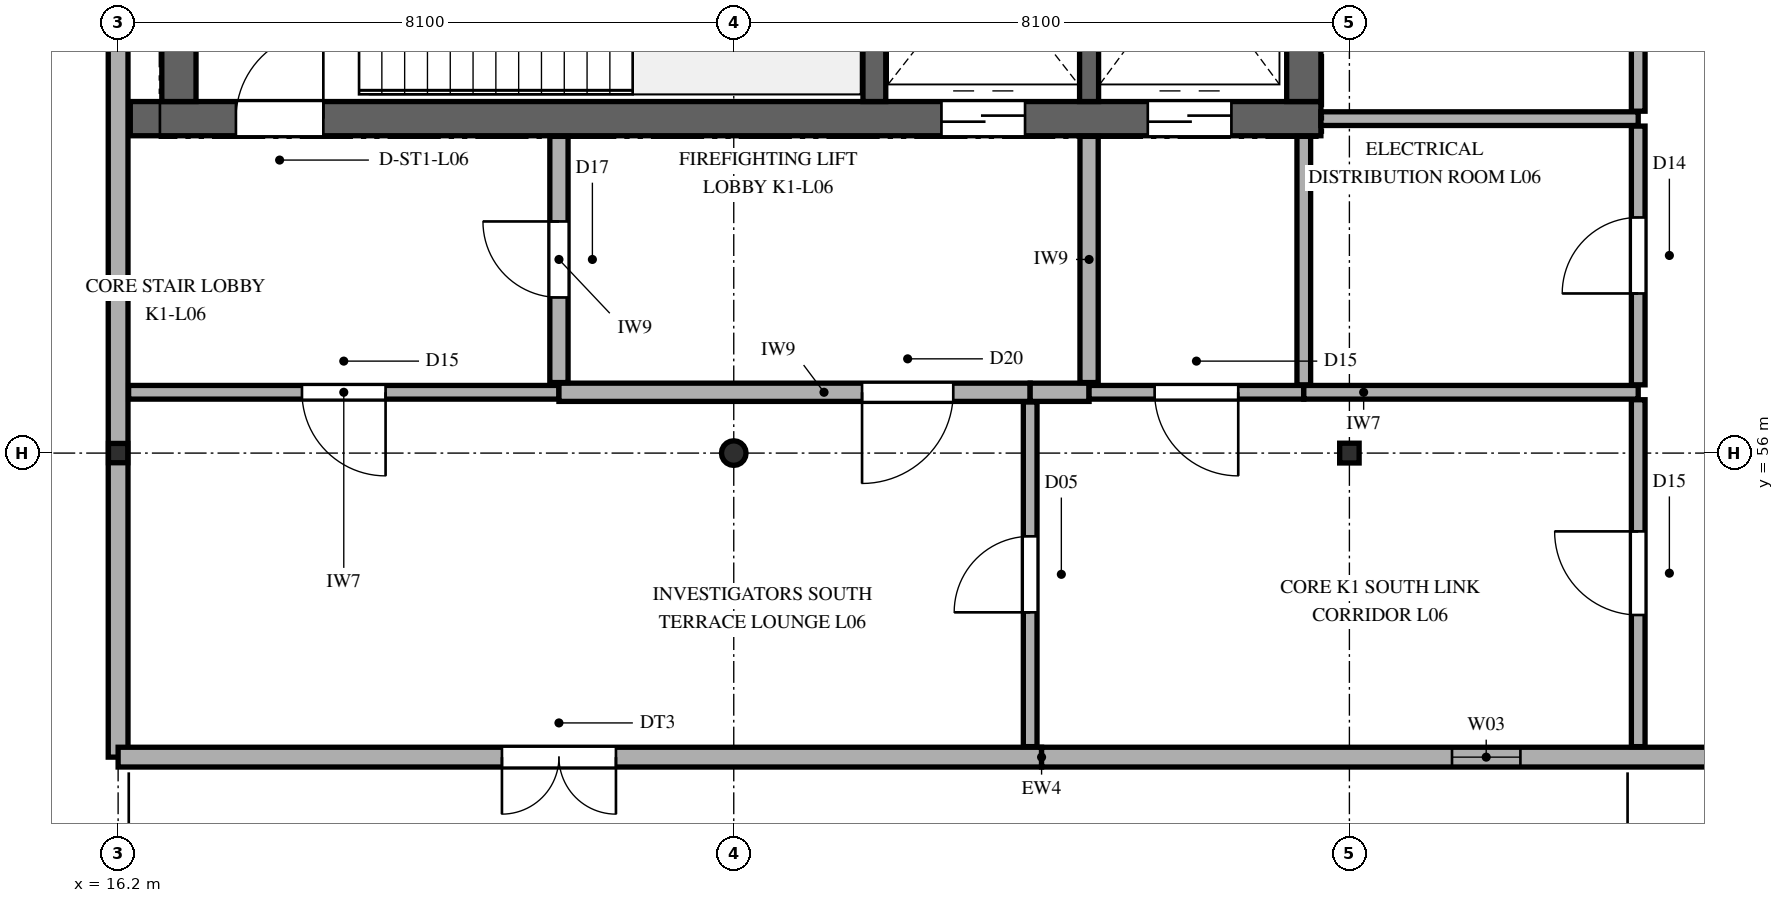
"""IFC4 building model, lengths in metres.
Left out: names, types, materials, properties, quantities, classifications, styles, units other than length and angle.
Written with IfcOpenShell. Run it as: python <this file> out.ifc"""

import sys

from ifc_helpers import new_model, si_unit, direction, frame, frame_2d, origin, origin_2d, place, context, subcontext, project, spatial, rectangle, hollow_rectangle, hollow_circle, i_section, extrude, element, fill, save


model = new_model("IFC4")
c1 = context("Model", 3, precision=1e-05, world=origin(), true_north=direction((0.0, 1.0)))
c2 = subcontext(c1, "Body", "Model", "MODEL_VIEW")
j1 = project(units=[si_unit("LENGTHUNIT", "METRE"), si_unit("PLANEANGLEUNIT", "RADIAN")], contexts=[c1])
p1 = place(None, origin())
s1 = spatial("IfcSite", under=j1, at=p1, CompositionType="ELEMENT")
p2 = place(p1, origin())
s2 = spatial("IfcBuilding", under=s1, at=p2, CompositionType="ELEMENT")
p3 = place(p2, frame((0.0, 0.0, 29.1)))
s3 = spatial("IfcBuildingStorey", under=s2, at=p3, CompositionType="ELEMENT", Elevation=29.1)
p4 = place(p3, frame((16.36, 60.4, 0.0), z_axis=(0.0, 0.0, 1.0), x_axis=(1.0, 0.0, 0.0)))
e1 = element("IfcWall", 1, at=p4, inside=s3, PredefinedType="SHEAR", context=c2, shape_type="SweptSolid", body=[
    extrude(rectangle(XDim=15.665, YDim=0.45, at=frame_2d((7.833, 0.0))), origin(), (0.0, 0.0, 1.0), 4.2),
])
p5 = place(p4, frame((1.39, 0.0, 0.0)))
e2 = element("IfcOpeningElement", 2, at=p5, cuts=e1, PredefinedType="OPENING", context=c2, shape_type="SweptSolid", body=[
    extrude(rectangle(XDim=1.15, YDim=2.25, at=frame_2d((0.575, 1.125))), frame((0.0, 0.235, 0.0), z_axis=(0.0, -1.0, 0.0), x_axis=(1.0, 0.0, 0.0)), (0.0, 0.0, 1.0), 0.47),
])
p6 = place(p4, frame((10.673, 0.0, 0.0)))
e3 = element("IfcOpeningElement", 3, at=p6, cuts=e1, PredefinedType="OPENING", context=c2, shape_type="SweptSolid", body=[
    extrude(rectangle(XDim=1.1, YDim=2.2, at=frame_2d((0.55, 1.1))), frame((0.0, 0.235, 0.0), z_axis=(0.0, -1.0, 0.0), x_axis=(1.0, 0.0, 0.0)), (0.0, 0.0, 1.0), 0.47),
])
p7 = place(p4, frame((13.387, 0.0, 0.0)))
e4 = element("IfcOpeningElement", 4, at=p7, cuts=e1, PredefinedType="OPENING", context=c2, shape_type="SweptSolid", body=[
    extrude(rectangle(XDim=1.1, YDim=2.2, at=frame_2d((0.55, 1.1))), frame((0.0, 0.235, 0.0), z_axis=(0.0, -1.0, 0.0), x_axis=(1.0, 0.0, 0.0)), (0.0, 0.0, 1.0), 0.47),
])
for number, where, z_axis, x_axis in (
    (5, (17.0, 60.625, 0.0), (0.0, 0.0, 1.0), (0.0, 1.0, 0.0)),
    (6, (31.8, 60.625, 0.0), (0.0, 0.0, 1.0), (0.0, 1.0, 0.0)),
):
    element("IfcWall", number, at=place(p3, frame(where, z_axis=z_axis, x_axis=x_axis)), inside=s3, PredefinedType="SHEAR", context=c2, shape_type="SweptSolid", body=[
        extrude(rectangle(XDim=7.95, YDim=0.45, at=frame_2d((3.975, 0.0))), origin(), (0.0, 0.0, 1.0), 4.2),
    ])
p8 = place(p3, frame((26.15, 60.625, 0.0), z_axis=(0.0, 0.0, 1.0), x_axis=(0.0, 1.0, 0.0)))
e7 = element("IfcWall", 7, at=p8, inside=s3, PredefinedType="SHEAR", context=c2, shape_type="SweptSolid", body=[
    extrude(rectangle(XDim=7.95, YDim=0.3, at=frame_2d((3.975, 0.0))), origin(), (0.0, 0.0, 1.0), 4.2),
])
p9 = place(p3, frame((28.975, 60.625, 0.0), z_axis=(0.0, 0.0, 1.0), x_axis=(0.0, 1.0, 0.0)))
e8 = element("IfcWall", 8, at=p9, inside=s3, PredefinedType="SHEAR", context=c2, shape_type="SweptSolid", body=[
    extrude(rectangle(XDim=7.95, YDim=0.25, at=frame_2d((3.975, 0.0))), origin(), (0.0, 0.0, 1.0), 4.2),
])
p10 = place(p3, frame((16.2, 56.0, 0.0), z_axis=(0.0, 0.0, 1.0), x_axis=(1.0, 0.0, 0.0)))
e9 = element("IfcColumn", 9, at=p10, inside=s3, PredefinedType="COLUMN", context=c2, shape_type="SweptSolid", body=[
    extrude(hollow_rectangle(XDim=0.254, YDim=0.254, WallThickness=0.013, InnerFilletRadius=0.013, OuterFilletRadius=0.025, at=origin_2d()), origin(), (0.0, 0.0, 1.0), 4.2),
])
p11 = place(p3, frame((24.3, 56.0, 0.0), z_axis=(0.0, 0.0, 1.0), x_axis=(1.0, 0.0, 0.0)))
e10 = element("IfcColumn", 10, at=p11, inside=s3, PredefinedType="COLUMN", context=c2, shape_type="SweptSolid", body=[
    extrude(hollow_circle(Radius=0.162, WallThickness=0.013, at=origin_2d()), origin(), (0.0, 0.0, 1.0), 4.2),
])
p12 = place(p3, frame((32.4, 56.0, 0.0), z_axis=(0.0, 0.0, 1.0), x_axis=(1.0, 0.0, 0.0)))
e11 = element("IfcColumn", 11, at=p12, inside=s3, PredefinedType="COLUMN", context=c2, shape_type="SweptSolid", body=[
    extrude(i_section(OverallWidth=0.256, OverallDepth=0.26, WebThickness=0.011, FlangeThickness=0.017, FilletRadius=0.013, at=origin_2d()), origin(), (0.0, 0.0, 1.0), 4.2),
])
p13 = place(p3, frame((16.2, 67.0, 0.0), z_axis=(0.0, 0.0, 1.0), x_axis=(0.0, -1.0, 0.0)))
e12 = element("IfcWall", 12, at=p13, inside=s3, PredefinedType="SOLIDWALL", context=c2, shape_type="SweptSolid", body=[
    extrude(rectangle(XDim=15.0, YDim=0.26, at=frame_2d((7.5, 0.0))), origin(), (0.0, 0.0, 1.0), 3.452),
])
p14 = place(p3, frame((16.2, 52.0, 0.0), z_axis=(0.0, 0.0, 1.0), x_axis=(1.0, 0.0, 0.0)))
e13 = element("IfcWall", 13, at=p14, inside=s3, PredefinedType="SOLIDWALL", context=c2, shape_type="SweptSolid", body=[
    extrude(rectangle(XDim=12.15, YDim=0.26, at=frame_2d((6.075, 0.0))), origin(), (0.0, 0.0, 1.0), 3.96),
])
p15 = place(p14, frame((5.05, 0.0, 0.0)))
e14 = element("IfcOpeningElement", 14, at=p15, cuts=e13, PredefinedType="OPENING", context=c2, shape_type="SweptSolid", body=[
    extrude(rectangle(XDim=1.5, YDim=2.3, at=frame_2d((0.75, 1.15))), frame((0.0, 0.14, 0.0), z_axis=(0.0, -1.0, 0.0), x_axis=(1.0, 0.0, 0.0)), (0.0, 0.0, 1.0), 0.28),
])
p16 = place(p3, frame((28.35, 52.0, 0.0), z_axis=(0.0, 0.0, 1.0), x_axis=(1.0, 0.0, 0.0)))
e15 = element("IfcWall", 15, at=p16, inside=s3, PredefinedType="SOLIDWALL", context=c2, shape_type="SweptSolid", body=[
    extrude(rectangle(XDim=12.15, YDim=0.26, at=frame_2d((6.075, 0.0))), origin(), (0.0, 0.0, 1.0), 3.96),
])
p17 = place(p16, frame((5.4, 0.0, 0.85)))
e16 = element("IfcOpeningElement", 16, at=p17, cuts=e15, PredefinedType="OPENING", context=c2, shape_type="SweptSolid", body=[
    extrude(rectangle(XDim=0.9, YDim=2.4, at=frame_2d((0.45, 1.2))), frame((0.0, 0.14, 0.0), z_axis=(0.0, -1.0, 0.0), x_axis=(1.0, 0.0, 0.0)), (0.0, 0.0, 1.0), 0.28),
])
p18 = place(p3, frame((16.338, 56.8, 0.0), z_axis=(0.0, 0.0, 1.0), x_axis=(1.0, 0.0, 0.0)))
e17 = element("IfcWall", 17, at=p18, inside=s3, PredefinedType="PARTITIONING", context=c2, shape_type="SweptSolid", body=[
    extrude(rectangle(XDim=5.662, YDim=0.18, at=frame_2d((2.831, 0.0))), origin(), (0.0, 0.0, 1.0), 3.96),
])
p19 = place(p18, frame((2.281, 0.0, 0.0)))
e18 = element("IfcOpeningElement", 18, at=p19, cuts=e17, PredefinedType="OPENING", context=c2, shape_type="SweptSolid", body=[
    extrude(rectangle(XDim=1.1, YDim=2.2, at=frame_2d((0.55, 1.1))), frame((0.0, 0.1, 0.0), z_axis=(0.0, -1.0, 0.0), x_axis=(1.0, 0.0, 0.0)), (0.0, 0.0, 1.0), 0.2),
])
p20 = place(p3, frame((22.0, 56.8, 0.0), z_axis=(0.0, 0.0, 1.0), x_axis=(1.0, 0.0, 0.0)))
e19 = element("IfcWall", 19, at=p20, inside=s3, PredefinedType="PARTITIONING", context=c2, shape_type="SweptSolid", body=[
    extrude(rectangle(XDim=6.2, YDim=0.24, at=frame_2d((3.1, 0.0))), origin(), (0.0, 0.0, 1.0), 3.96),
])
p21 = place(p20, frame((3.988, 0.0, 0.0)))
e20 = element("IfcOpeningElement", 20, at=p21, cuts=e19, PredefinedType="OPENING", context=c2, shape_type="SweptSolid", body=[
    extrude(rectangle(XDim=1.2, YDim=2.3, at=frame_2d((0.6, 1.15))), frame((0.0, 0.13, 0.0), z_axis=(0.0, -1.0, 0.0), x_axis=(1.0, 0.0, 0.0)), (0.0, 0.0, 1.0), 0.26),
])
p22 = place(p3, frame((28.2, 56.8, 0.0), z_axis=(0.0, 0.0, 1.0), x_axis=(1.0, 0.0, 0.0)))
e21 = element("IfcWall", 21, at=p22, inside=s3, PredefinedType="PARTITIONING", context=c2, shape_type="SweptSolid", body=[
    extrude(rectangle(XDim=0.775, YDim=0.24, at=frame_2d((0.388, 0.0))), origin(), (0.0, 0.0, 1.0), 3.96),
])
p23 = place(p3, frame((28.975, 56.8, 0.0), z_axis=(0.0, 0.0, 1.0), x_axis=(1.0, 0.0, 0.0)))
e22 = element("IfcWall", 22, at=p23, inside=s3, PredefinedType="PARTITIONING", context=c2, shape_type="SweptSolid", body=[
    extrude(rectangle(XDim=2.825, YDim=0.18, at=frame_2d((1.413, 0.0))), origin(), (0.0, 0.0, 1.0), 3.96),
])
p24 = place(p23, frame((0.863, 0.0, 0.0)))
e23 = element("IfcOpeningElement", 23, at=p24, cuts=e22, PredefinedType="OPENING", context=c2, shape_type="SweptSolid", body=[
    extrude(rectangle(XDim=1.1, YDim=2.2, at=frame_2d((0.55, 1.1))), frame((0.0, 0.1, 0.0), z_axis=(0.0, -1.0, 0.0), x_axis=(1.0, 0.0, 0.0)), (0.0, 0.0, 1.0), 0.2),
])
p25 = place(p3, frame((31.8, 56.8, 0.0), z_axis=(0.0, 0.0, 1.0), x_axis=(1.0, 0.0, 0.0)))
e24 = element("IfcWall", 24, at=p25, inside=s3, PredefinedType="PARTITIONING", context=c2, shape_type="SweptSolid", body=[
    extrude(rectangle(XDim=4.4, YDim=0.18, at=frame_2d((2.2, 0.0))), origin(), (0.0, 0.0, 1.0), 3.96),
])
p26 = place(p3, frame((32.025, 60.4, 0.0), z_axis=(0.0, 0.0, 1.0), x_axis=(1.0, 0.0, 0.0)))
e25 = element("IfcWall", 25, at=p26, inside=s3, PredefinedType="PARTITIONING", context=c2, shape_type="SweptSolid", body=[
    extrude(rectangle(XDim=4.175, YDim=0.18, at=frame_2d((2.087, 0.0))), origin(), (0.0, 0.0, 1.0), 3.96),
])
p27 = place(p3, frame((22.0, 56.928, 0.0), z_axis=(0.0, 0.0, 1.0), x_axis=(0.0, 1.0, 0.0)))
e26 = element("IfcWall", 26, at=p27, inside=s3, PredefinedType="PARTITIONING", context=c2, shape_type="SweptSolid", body=[
    extrude(rectangle(XDim=3.239, YDim=0.24, at=frame_2d((1.62, 0.0))), origin(), (0.0, 0.0, 1.0), 3.96),
])
p28 = place(p27, frame((1.119, 0.0, 0.0)))
e27 = element("IfcOpeningElement", 27, at=p28, cuts=e26, PredefinedType="OPENING", context=c2, shape_type="SweptSolid", body=[
    extrude(rectangle(XDim=1.0, YDim=2.2, at=frame_2d((0.5, 1.1))), frame((0.0, 0.13, 0.0), z_axis=(0.0, -1.0, 0.0), x_axis=(1.0, 0.0, 0.0)), (0.0, 0.0, 1.0), 0.26),
])
p29 = place(p3, frame((28.2, 52.138, 0.0), z_axis=(0.0, 0.0, 1.0), x_axis=(0.0, 1.0, 0.0)))
e28 = element("IfcWall", 28, at=p29, inside=s3, PredefinedType="PARTITIONING", context=c2, shape_type="SweptSolid", body=[
    extrude(rectangle(XDim=4.534, YDim=0.18, at=frame_2d((2.267, 0.0))), origin(), (0.0, 0.0, 1.0), 3.96),
])
p30 = place(p29, frame((1.767, 0.0, 0.0)))
e29 = element("IfcOpeningElement", 29, at=p30, cuts=e28, PredefinedType="OPENING", context=c2, shape_type="SweptSolid", body=[
    extrude(rectangle(XDim=1.0, YDim=2.2, at=frame_2d((0.5, 1.1))), frame((0.0, 0.1, 0.0), z_axis=(0.0, -1.0, 0.0), x_axis=(1.0, 0.0, 0.0)), (0.0, 0.0, 1.0), 0.2),
])
p31 = place(p3, frame((28.975, 56.928, 0.0), z_axis=(0.0, 0.0, 1.0), x_axis=(0.0, 1.0, 0.0)))
e30 = element("IfcWall", 30, at=p31, inside=s3, PredefinedType="PARTITIONING", context=c2, shape_type="SweptSolid", body=[
    extrude(rectangle(XDim=3.239, YDim=0.24, at=frame_2d((1.62, 0.0))), origin(), (0.0, 0.0, 1.0), 3.96),
])
p32 = place(p3, frame((31.8, 56.898, 0.0), z_axis=(0.0, 0.0, 1.0), x_axis=(0.0, 1.0, 0.0)))
e31 = element("IfcWall", 31, at=p32, inside=s3, PredefinedType="PARTITIONING", context=c2, shape_type="SweptSolid", body=[
    extrude(rectangle(XDim=3.269, YDim=0.18, at=frame_2d((1.635, 0.0))), origin(), (0.0, 0.0, 1.0), 3.96),
])
p33 = place(p3, frame((36.2, 52.138, 0.0), z_axis=(0.0, 0.0, 1.0), x_axis=(0.0, 1.0, 0.0)))
e32 = element("IfcWall", 32, at=p33, inside=s3, PredefinedType="PARTITIONING", context=c2, shape_type="SweptSolid", body=[
    extrude(rectangle(XDim=4.564, YDim=0.18, at=frame_2d((2.282, 0.0))), origin(), (0.0, 0.0, 1.0), 3.96),
])
p34 = place(p33, frame((1.732, 0.0, 0.0)))
e33 = element("IfcOpeningElement", 33, at=p34, cuts=e32, PredefinedType="OPENING", context=c2, shape_type="SweptSolid", body=[
    extrude(rectangle(XDim=1.1, YDim=2.2, at=frame_2d((0.55, 1.1))), frame((0.0, 0.1, 0.0), z_axis=(0.0, -1.0, 0.0), x_axis=(1.0, 0.0, 0.0)), (0.0, 0.0, 1.0), 0.2),
])
p35 = place(p3, frame((36.2, 56.898, 0.0), z_axis=(0.0, 0.0, 1.0), x_axis=(0.0, 1.0, 0.0)))
e34 = element("IfcWall", 34, at=p35, inside=s3, PredefinedType="PARTITIONING", context=c2, shape_type="SweptSolid", body=[
    extrude(rectangle(XDim=3.404, YDim=0.18, at=frame_2d((1.702, 0.0))), origin(), (0.0, 0.0, 1.0), 3.96),
])
p36 = place(p35, frame((1.202, 0.0, 0.0)))
e35 = element("IfcOpeningElement", 35, at=p36, cuts=e34, PredefinedType="OPENING", context=c2, shape_type="SweptSolid", body=[
    extrude(rectangle(XDim=1.0, YDim=2.15, at=frame_2d((0.5, 1.075))), frame((0.0, 0.1, 0.0), z_axis=(0.0, -1.0, 0.0), x_axis=(1.0, 0.0, 0.0)), (0.0, 0.0, 1.0), 0.2),
])
p37 = place(p3, frame((36.2, 60.498, 0.0), z_axis=(0.0, 0.0, 1.0), x_axis=(0.0, 1.0, 0.0)))
e36 = element("IfcWall", 36, at=p37, inside=s3, PredefinedType="PARTITIONING", context=c2, shape_type="SweptSolid", body=[
    extrude(rectangle(XDim=2.614, YDim=0.18, at=frame_2d((1.307, 0.0))), origin(), (0.0, 0.0, 1.0), 3.96),
])
p38 = place(p37, frame((0.832, 0.0, 0.0)))
e37 = element("IfcOpeningElement", 37, at=p38, cuts=e36, PredefinedType="OPENING", context=c2, shape_type="SweptSolid", body=[
    extrude(rectangle(XDim=0.95, YDim=2.1, at=frame_2d((0.475, 1.05))), frame((0.0, 0.1, 0.0), z_axis=(0.0, -1.0, 0.0), x_axis=(1.0, 0.0, 0.0)), (0.0, 0.0, 1.0), 0.2),
])
p39 = place(p15, frame((1.5, 0.0, 0.0), z_axis=(0.0, 0.0, 1.0), x_axis=(-1.0, 0.0, 0.0)))
e38 = element("IfcDoor", 38, at=p39, inside=s3, OperationType="DOUBLE_DOOR_SINGLE_SWING", PredefinedType="DOOR", context=c2, shape_type="SweptSolid", body=[
    extrude(rectangle(XDim=1.5, YDim=2.3, at=frame_2d((0.75, 1.15))), frame((0.0, 0.025, 0.0), z_axis=(0.0, -1.0, 0.0), x_axis=(1.0, 0.0, 0.0)), (0.0, 0.0, 1.0), 0.05),
])
fill(e14, e38)
p40 = place(p17, origin())
e39 = element("IfcWindow", 39, at=p40, inside=s3, PartitioningType="DOUBLE_PANEL_HORIZONTAL", PredefinedType="WINDOW", context=c2, shape_type="SweptSolid", body=[
    extrude(rectangle(XDim=0.9, YDim=2.4, at=frame_2d((0.45, 1.2))), frame((0.0, 0.03, 0.0), z_axis=(0.0, -1.0, 0.0), x_axis=(1.0, 0.0, 0.0)), (0.0, 0.0, 1.0), 0.06),
])
fill(e16, e39)
p41 = place(p5, origin())
e40 = element("IfcDoor", 40, at=p41, inside=s3, OperationType="SINGLE_SWING_RIGHT", PredefinedType="DOOR", context=c2, shape_type="SweptSolid", body=[
    extrude(rectangle(XDim=1.15, YDim=2.25, at=frame_2d((0.575, 1.125))), frame((0.0, 0.025, 0.0), z_axis=(0.0, -1.0, 0.0), x_axis=(1.0, 0.0, 0.0)), (0.0, 0.0, 1.0), 0.05),
])
fill(e2, e40)
p42 = place(p6, frame((1.1, 0.0, 0.0), z_axis=(0.0, 0.0, 1.0), x_axis=(-1.0, 0.0, 0.0)))
e41 = element("IfcDoor", 41, at=p42, inside=s3, OperationType="DOUBLE_DOOR_SLIDING", PredefinedType="DOOR", context=c2, shape_type="SweptSolid", body=[
    extrude(rectangle(XDim=1.1, YDim=2.2, at=frame_2d((0.55, 1.1))), frame((0.0, 0.025, 0.0), z_axis=(0.0, -1.0, 0.0), x_axis=(1.0, 0.0, 0.0)), (0.0, 0.0, 1.0), 0.05),
])
fill(e3, e41)
p43 = place(p7, frame((1.1, 0.0, 0.0), z_axis=(0.0, 0.0, 1.0), x_axis=(-1.0, 0.0, 0.0)))
e42 = element("IfcDoor", 42, at=p43, inside=s3, OperationType="DOUBLE_DOOR_SLIDING", PredefinedType="DOOR", context=c2, shape_type="SweptSolid", body=[
    extrude(rectangle(XDim=1.1, YDim=2.2, at=frame_2d((0.55, 1.1))), frame((0.0, 0.025, 0.0), z_axis=(0.0, -1.0, 0.0), x_axis=(1.0, 0.0, 0.0)), (0.0, 0.0, 1.0), 0.05),
])
fill(e4, e42)
p44 = place(p19, frame((1.1, 0.0, 0.0), z_axis=(0.0, 0.0, 1.0), x_axis=(-1.0, 0.0, 0.0)))
e43 = element("IfcDoor", 43, at=p44, inside=s3, OperationType="SINGLE_SWING_RIGHT", PredefinedType="DOOR", context=c2, shape_type="SweptSolid", body=[
    extrude(rectangle(XDim=1.1, YDim=2.2, at=frame_2d((0.55, 1.1))), frame((0.0, 0.025, 0.0), z_axis=(0.0, -1.0, 0.0), x_axis=(1.0, 0.0, 0.0)), (0.0, 0.0, 1.0), 0.05),
])
fill(e18, e43)
p45 = place(p21, frame((1.2, 0.0, 0.0), z_axis=(0.0, 0.0, 1.0), x_axis=(-1.0, 0.0, 0.0)))
e44 = element("IfcDoor", 44, at=p45, inside=s3, OperationType="SINGLE_SWING_LEFT", PredefinedType="DOOR", context=c2, shape_type="SweptSolid", body=[
    extrude(rectangle(XDim=1.2, YDim=2.3, at=frame_2d((0.6, 1.15))), frame((0.0, 0.025, 0.0), z_axis=(0.0, -1.0, 0.0), x_axis=(1.0, 0.0, 0.0)), (0.0, 0.0, 1.0), 0.05),
])
fill(e20, e44)
p46 = place(p24, frame((1.1, 0.0, 0.0), z_axis=(0.0, 0.0, 1.0), x_axis=(-1.0, 0.0, 0.0)))
e45 = element("IfcDoor", 45, at=p46, inside=s3, OperationType="SINGLE_SWING_RIGHT", PredefinedType="DOOR", context=c2, shape_type="SweptSolid", body=[
    extrude(rectangle(XDim=1.1, YDim=2.2, at=frame_2d((0.55, 1.1))), frame((0.0, 0.025, 0.0), z_axis=(0.0, -1.0, 0.0), x_axis=(1.0, 0.0, 0.0)), (0.0, 0.0, 1.0), 0.05),
])
fill(e23, e45)
p47 = place(p28, origin())
e46 = element("IfcDoor", 46, at=p47, inside=s3, OperationType="SINGLE_SWING_RIGHT", PredefinedType="DOOR", context=c2, shape_type="SweptSolid", body=[
    extrude(rectangle(XDim=1.0, YDim=2.2, at=frame_2d((0.5, 1.1))), frame((0.0, 0.025, 0.0), z_axis=(0.0, -1.0, 0.0), x_axis=(1.0, 0.0, 0.0)), (0.0, 0.0, 1.0), 0.05),
])
fill(e27, e46)
p48 = place(p30, origin())
e47 = element("IfcDoor", 47, at=p48, inside=s3, OperationType="SINGLE_SWING_LEFT", PredefinedType="DOOR", context=c2, shape_type="SweptSolid", body=[
    extrude(rectangle(XDim=1.0, YDim=2.2, at=frame_2d((0.5, 1.1))), frame((0.0, 0.025, 0.0), z_axis=(0.0, -1.0, 0.0), x_axis=(1.0, 0.0, 0.0)), (0.0, 0.0, 1.0), 0.05),
])
fill(e29, e47)
p49 = place(p34, origin())
e48 = element("IfcDoor", 48, at=p49, inside=s3, OperationType="SINGLE_SWING_RIGHT", PredefinedType="DOOR", context=c2, shape_type="SweptSolid", body=[
    extrude(rectangle(XDim=1.1, YDim=2.2, at=frame_2d((0.55, 1.1))), frame((0.0, 0.025, 0.0), z_axis=(0.0, -1.0, 0.0), x_axis=(1.0, 0.0, 0.0)), (0.0, 0.0, 1.0), 0.05),
])
fill(e33, e48)
p50 = place(p36, origin())
e49 = element("IfcDoor", 49, at=p50, inside=s3, OperationType="SINGLE_SWING_LEFT", PredefinedType="DOOR", context=c2, shape_type="SweptSolid", body=[
    extrude(rectangle(XDim=1.0, YDim=2.15, at=frame_2d((0.5, 1.075))), frame((0.0, 0.025, 0.0), z_axis=(0.0, -1.0, 0.0), x_axis=(1.0, 0.0, 0.0)), (0.0, 0.0, 1.0), 0.05),
])
fill(e35, e49)
save(model, sys.argv[1])
